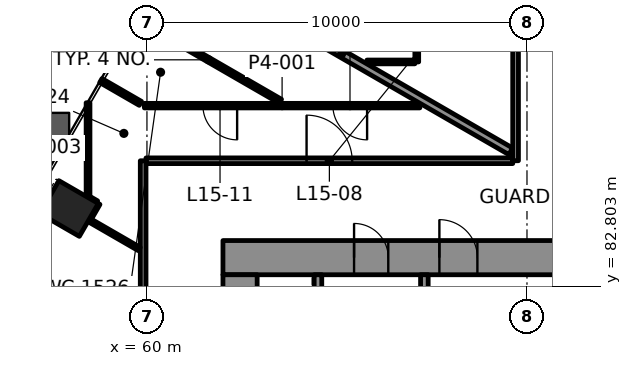
"""IFC4 building model, lengths in metres.
Left out: names, types, materials, properties, quantities, classifications, styles, units other than length and angle.
Written with IfcOpenShell. Run it as: python <this file> out.ifc"""

import sys

from ifc_helpers import new_model, si_unit, direction, frame, frame_2d, origin, origin_2d, place, context, subcontext, project, spatial, rectangle, extrude, element, fill, save


model = new_model("IFC4")
c1 = context("Model", 3, precision=1e-05, world=origin(), true_north=direction((0.0, 1.0)))
c2 = subcontext(c1, "Body", "Model", "MODEL_VIEW")
j1 = project(units=[si_unit("LENGTHUNIT", "METRE"), si_unit("PLANEANGLEUNIT", "RADIAN")], contexts=[c1])
p1 = place(None, origin())
s1 = spatial("IfcSite", under=j1, at=p1, CompositionType="ELEMENT")
p2 = place(p1, origin())
s2 = spatial("IfcBuilding", under=s1, at=p2, CompositionType="ELEMENT")
p3 = place(p2, frame((0.0, 0.0, 69.4)))
s3 = spatial("IfcBuildingStorey", under=s2, at=p3, CompositionType="ELEMENT", Elevation=69.4)
p4 = place(p3, frame((57.951, 84.843, -0.0), z_axis=(0.0, 0.0, 1.0), x_axis=(-0.5, -0.866025403784, 0.0)))
e1 = element("IfcColumn", 1, at=p4, inside=s3, PredefinedType="COLUMN", context=c2, shape_type="SweptSolid", body=[
    extrude(rectangle(XDim=1.0, YDim=1.2, at=origin_2d()), origin(), (0.0, 0.0, 1.0), 4.2),
])
p5 = place(p3, frame((62.0, 83.55, 0.0), z_axis=(0.0, 0.0, 1.0), x_axis=(1.0, 0.0, 0.0)))
e2 = element("IfcWall", 2, at=p5, inside=s3, PredefinedType="SHEAR", context=c2, shape_type="SweptSolid", body=[
    extrude(rectangle(XDim=26.0, YDim=0.9, at=frame_2d((13.0, 0.0))), origin(), (0.0, 0.0, 1.0), 4.0),
])
p6 = place(p5, frame((5.695, 0.0, 0.0)))
e3 = element("IfcOpeningElement", 3, at=p6, cuts=e2, PredefinedType="OPENING", context=c2, shape_type="SweptSolid", body=[
    extrude(rectangle(XDim=1.0, YDim=2.1, at=frame_2d((0.5, 1.05))), frame((0.0, 0.46, 0.0), z_axis=(0.0, -1.0, 0.0), x_axis=(1.0, 0.0, 0.0)), (0.0, 0.0, 1.0), 0.92),
])
p7 = place(p5, frame((19.505, 0.0, 0.0)))
e4 = element("IfcOpeningElement", 4, at=p7, cuts=e2, PredefinedType="OPENING", context=c2, shape_type="SweptSolid", body=[
    extrude(rectangle(XDim=1.0, YDim=2.1, at=frame_2d((0.5, 1.05))), frame((0.0, 0.46, 0.0), z_axis=(0.0, -1.0, 0.0), x_axis=(1.0, 0.0, 0.0)), (0.0, 0.0, 1.0), 0.92),
])
p8 = place(p5, frame((3.45, 0.0, 0.0)))
e5 = element("IfcOpeningElement", 5, at=p8, cuts=e2, PredefinedType="OPENING", context=c2, shape_type="SweptSolid", body=[
    extrude(rectangle(XDim=0.9, YDim=2.1, at=frame_2d((0.45, 1.05))), frame((0.0, 0.46, 0.0), z_axis=(0.0, -1.0, 0.0), x_axis=(1.0, 0.0, 0.0)), (0.0, 0.0, 1.0), 0.92),
])
p9 = place(p5, frame((12.65, 0.0, 0.0)))
e6 = element("IfcOpeningElement", 6, at=p9, cuts=e2, PredefinedType="OPENING", context=c2, shape_type="SweptSolid", body=[
    extrude(rectangle(XDim=0.9, YDim=2.1, at=frame_2d((0.45, 1.05))), frame((0.0, 0.46, 0.0), z_axis=(0.0, -1.0, 0.0), x_axis=(1.0, 0.0, 0.0)), (0.0, 0.0, 1.0), 0.92),
])
p10 = place(p5, frame((22.55, 0.0, 0.0)))
e7 = element("IfcOpeningElement", 7, at=p10, cuts=e2, PredefinedType="OPENING", context=c2, shape_type="SweptSolid", body=[
    extrude(rectangle(XDim=0.9, YDim=2.1, at=frame_2d((0.45, 1.05))), frame((0.0, 0.46, 0.0), z_axis=(0.0, -1.0, 0.0), x_axis=(1.0, 0.0, 0.0)), (0.0, 0.0, 1.0), 0.92),
])
p11 = place(p3, frame((62.45, 66.9, 0.0), z_axis=(0.0, 0.0, 1.0), x_axis=(0.0, 1.0, 0.0)))
e8 = element("IfcWall", 8, at=p11, inside=s3, PredefinedType="SHEAR", context=c2, shape_type="SweptSolid", body=[
    extrude(rectangle(XDim=16.2, YDim=0.9, at=frame_2d((8.1, 0.0))), origin(), (0.0, 0.0, 1.0), 4.0),
])
p12 = place(p11, frame((5.5, 0.0, 0.0)))
e9 = element("IfcOpeningElement", 9, at=p12, cuts=e8, PredefinedType="OPENING", context=c2, shape_type="SweptSolid", body=[
    extrude(rectangle(XDim=1.8, YDim=2.1, at=frame_2d((0.9, 1.05))), frame((0.0, 0.46, 0.0), z_axis=(0.0, -1.0, 0.0), x_axis=(1.0, 0.0, 0.0)), (0.0, 0.0, 1.0), 0.92),
])
p13 = place(p3, frame((59.976, 86.1, 0.0), z_axis=(0.0, 0.0, 1.0), x_axis=(1.0, 0.0, 0.0)))
e10 = element("IfcWall", 10, at=p13, inside=s3, PredefinedType="PARTITIONING", context=c2, shape_type="SweptSolid", body=[
    extrude(rectangle(XDim=9.649, YDim=0.15, at=frame_2d((4.825, 0.0))), origin(), (0.0, 0.0, 1.0), 3.4),
])
p14 = place(p13, frame((4.225, 0.0, 0.0)))
e11 = element("IfcOpeningElement", 11, at=p14, cuts=e10, PredefinedType="OPENING", context=c2, shape_type="SweptSolid", body=[
    extrude(rectangle(XDim=1.2, YDim=2.1, at=frame_2d((0.6, 1.05))), frame((0.0, 0.085, 0.0), z_axis=(0.0, -1.0, 0.0), x_axis=(1.0, 0.0, 0.0)), (0.0, 0.0, 1.0), 0.17),
])
p15 = place(p3, frame((67.181, 87.55, 0.0), z_axis=(0.0, 0.0, 1.0), x_axis=(-1.0, 0.0, 0.0)))
e12 = element("IfcWall", 12, at=p15, inside=s3, PredefinedType="PARTITIONING", context=c2, shape_type="SweptSolid", body=[
    extrude(rectangle(XDim=7.249, YDim=0.12, at=frame_2d((3.625, 0.0))), origin(), (0.0, 0.0, 1.0), 3.4),
])
p16 = place(p15, frame((1.388, 0.0, 0.0)))
e13 = element("IfcOpeningElement", 13, at=p16, cuts=e12, PredefinedType="OPENING", context=c2, shape_type="SweptSolid", body=[
    extrude(rectangle(XDim=0.9, YDim=2.1, at=frame_2d((0.45, 1.05))), frame((0.0, 0.07, 0.0), z_axis=(0.0, -1.0, 0.0), x_axis=(1.0, 0.0, 0.0)), (0.0, 0.0, 1.0), 0.14),
])
p17 = place(p15, frame((4.807, 0.0, 0.0)))
e14 = element("IfcOpeningElement", 14, at=p17, cuts=e12, PredefinedType="OPENING", context=c2, shape_type="SweptSolid", body=[
    extrude(rectangle(XDim=0.9, YDim=2.1, at=frame_2d((0.45, 1.05))), frame((0.0, 0.07, 0.0), z_axis=(0.0, -1.0, 0.0), x_axis=(1.0, 0.0, 0.0)), (0.0, 0.0, 1.0), 0.14),
])
p18 = place(p3, frame((65.789, 88.7, 0.0), z_axis=(0.0, 0.0, 1.0), x_axis=(1.0, 0.0, 0.0)))
e15 = element("IfcWall", 15, at=p18, inside=s3, PredefinedType="PARTITIONING", context=c2, shape_type="SweptSolid", body=[
    extrude(rectangle(XDim=1.261, YDim=0.1, at=frame_2d((0.631, 0.0))), origin(), (0.0, 0.0, 1.0), 3.4),
])
p19 = place(p3, frame((58.496, 84.587, 0.0), z_axis=(0.0, 0.0, 1.0), x_axis=(0.500114568548, 0.865959247497, 0.0)))
e16 = element("IfcWall", 16, at=p19, inside=s3, PredefinedType="PARTITIONING", context=c2, shape_type="SweptSolid", body=[
    extrude(rectangle(XDim=0.449, YDim=0.1, at=frame_2d((0.225, 0.0))), origin(), (0.0, 0.0, 1.0), 3.4),
])
p20 = place(p3, frame((69.7, 86.1, 0.0), z_axis=(0.0, 0.0, 1.0), x_axis=(0.0, 1.0, 0.0)))
e17 = element("IfcWall", 17, at=p20, inside=s3, PredefinedType="PARTITIONING", context=c2, shape_type="SweptSolid", body=[
    extrude(rectangle(XDim=10.6, YDim=0.15, at=frame_2d((5.3, 0.0))), origin(), (0.0, 0.0, 1.0), 3.4),
])
p21 = place(p3, frame((67.1, 99.3, 0.0), z_axis=(0.0, 0.0, 1.0), x_axis=(0.0, -1.0, 0.0)))
e18 = element("IfcWall", 18, at=p21, inside=s3, PredefinedType="PARTITIONING", context=c2, shape_type="SweptSolid", body=[
    extrude(rectangle(XDim=10.6, YDim=0.1, at=frame_2d((5.3, 0.0))), origin(), (0.0, 0.0, 1.0), 3.4),
])
p22 = place(p21, frame((7.088, 0.0, 0.0)))
e19 = element("IfcOpeningElement", 19, at=p22, cuts=e18, PredefinedType="OPENING", context=c2, shape_type="SweptSolid", body=[
    extrude(rectangle(XDim=0.9, YDim=2.1, at=frame_2d((0.45, 1.05))), frame((0.0, 0.06, 0.0), z_axis=(0.0, -1.0, 0.0), x_axis=(1.0, 0.0, 0.0)), (0.0, 0.0, 1.0), 0.12),
])
p23 = place(p3, frame((59.9, 67.321, 0.0), z_axis=(0.0, 0.0, 1.0), x_axis=(0.0, 1.0, 0.0)))
e20 = element("IfcWall", 20, at=p23, inside=s3, PredefinedType="PARTITIONING", context=c2, shape_type="SweptSolid", body=[
    extrude(rectangle(XDim=18.778, YDim=0.15, at=frame_2d((9.389, 0.0))), origin(), (0.0, 0.0, 1.0), 3.4),
])
p24 = place(p3, frame((58.45, 85.133, 0.0), z_axis=(0.0, 0.0, 1.0), x_axis=(0.0, 1.0, 0.0)))
e21 = element("IfcWall", 21, at=p24, inside=s3, PredefinedType="PARTITIONING", context=c2, shape_type="SweptSolid", body=[
    extrude(rectangle(XDim=2.494, YDim=0.1, at=frame_2d((1.247, 0.0))), origin(), (0.0, 0.0, 1.0), 3.165),
])
p25 = place(p3, frame((69.573, 86.348, 0.0), z_axis=(0.0, 0.0, 1.0), x_axis=(-0.866024495625, 0.500001572974, 0.0)))
e22 = element("IfcWall", 22, at=p25, inside=s3, PredefinedType="PARTITIONING", context=c2, shape_type="SweptSolid", body=[
    extrude(rectangle(XDim=10.272, YDim=0.2, at=frame_2d((5.136, 0.0))), origin(), (0.0, 0.0, 1.0), 3.165),
])
p26 = place(p3, frame((63.512, 87.665, 0.0), z_axis=(0.0, 0.0, 1.0), x_axis=(-0.866014185868, 0.500019429497, 0.0)))
e23 = element("IfcWall", 23, at=p26, inside=s3, PredefinedType="PARTITIONING", context=c2, shape_type="SweptSolid", body=[
    extrude(rectangle(XDim=4.365, YDim=0.12, at=frame_2d((2.182, 0.0))), origin(), (0.0, 0.0, 1.0), 3.165),
])
p27 = place(p3, frame((59.828, 87.61, 0.0), z_axis=(0.0, 0.0, 1.0), x_axis=(-0.865996090227, 0.500050769134, 0.0)))
e24 = element("IfcWall", 24, at=p27, inside=s3, PredefinedType="PARTITIONING", context=c2, shape_type="SweptSolid", body=[
    extrude(rectangle(XDim=1.202, YDim=0.12, at=frame_2d((0.601, 0.0))), origin(), (0.0, 0.0, 1.0), 3.165),
])
p28 = place(p3, frame((58.677, 85.001, 0.0), z_axis=(0.0, 0.0, 1.0), x_axis=(-0.86610613113, 0.49986015006, 0.0)))
e25 = element("IfcWall", 25, at=p28, inside=s3, PredefinedType="PARTITIONING", context=c2, shape_type="SweptSolid", body=[
    extrude(rectangle(XDim=0.205, YDim=0.1, at=frame_2d((0.102, 0.0))), origin(), (0.0, 0.0, 1.0), 3.4),
])
p29 = place(p3, frame((59.799, 83.776, 0.0), z_axis=(0.0, 0.0, 1.0), x_axis=(-0.866029087811, 0.499993619025, 0.0)))
e26 = element("IfcWall", 26, at=p29, inside=s3, PredefinedType="PARTITIONING", context=c2, shape_type="SweptSolid", body=[
    extrude(rectangle(XDim=1.533, YDim=0.1, at=frame_2d((0.766, 0.0))), origin(), (0.0, 0.0, 1.0), 3.4),
])
p30 = place(p3, frame((64.5, 77.9, 0.0), z_axis=(0.0, 0.0, 1.0), x_axis=(0.0, 1.0, 0.0)))
e27 = element("IfcWall", 27, at=p30, inside=s3, PredefinedType="PARTITIONING", context=c2, shape_type="SweptSolid", body=[
    extrude(rectangle(XDim=5.2, YDim=0.2, at=frame_2d((2.6, 0.0))), origin(), (0.0, 0.0, 1.0), 4.0),
])
p31 = place(p3, frame((67.3, 81.28, 0.0), z_axis=(0.0, 0.0, 1.0), x_axis=(0.0, 1.0, 0.0)))
e28 = element("IfcWall", 28, at=p31, inside=s3, PredefinedType="PARTITIONING", context=c2, shape_type="SweptSolid", body=[
    extrude(rectangle(XDim=1.82, YDim=0.2, at=frame_2d((0.91, 0.0))), origin(), (0.0, 0.0, 1.0), 4.0),
])
p32 = place(p14, origin())
e29 = element("IfcDoor", 29, at=p32, inside=s3, OperationType="DOUBLE_DOOR_SINGLE_SWING", PredefinedType="DOOR", context=c2, shape_type="SweptSolid", body=[
    extrude(rectangle(XDim=1.2, YDim=2.1, at=frame_2d((0.6, 1.05))), frame((0.0, 0.025, 0.0), z_axis=(0.0, -1.0, 0.0), x_axis=(1.0, 0.0, 0.0)), (0.0, 0.0, 1.0), 0.05),
])
fill(e11, e29)
p33 = place(p16, origin())
e30 = element("IfcDoor", 30, at=p33, inside=s3, OperationType="SINGLE_SWING_LEFT", PredefinedType="DOOR", context=c2, shape_type="SweptSolid", body=[
    extrude(rectangle(XDim=0.9, YDim=2.1, at=frame_2d((0.45, 1.05))), frame((0.0, 0.025, 0.0), z_axis=(0.0, -1.0, 0.0), x_axis=(1.0, 0.0, 0.0)), (0.0, 0.0, 1.0), 0.05),
])
fill(e13, e30)
p34 = place(p17, origin())
e31 = element("IfcDoor", 31, at=p34, inside=s3, OperationType="SINGLE_SWING_RIGHT", PredefinedType="DOOR", context=c2, shape_type="SweptSolid", body=[
    extrude(rectangle(XDim=0.9, YDim=2.1, at=frame_2d((0.45, 1.05))), frame((0.0, 0.025, 0.0), z_axis=(0.0, -1.0, 0.0), x_axis=(1.0, 0.0, 0.0)), (0.0, 0.0, 1.0), 0.05),
])
fill(e14, e31)
p35 = place(p6, origin())
e32 = element("IfcDoor", 32, at=p35, inside=s3, OperationType="SINGLE_SWING_LEFT", PredefinedType="DOOR", context=c2, shape_type="SweptSolid", body=[
    extrude(rectangle(XDim=1.0, YDim=2.1, at=frame_2d((0.5, 1.05))), frame((0.0, 0.17, 0.0), z_axis=(0.0, -1.0, 0.0), x_axis=(1.0, 0.0, 0.0)), (0.0, 0.0, 1.0), 0.34),
])
fill(e3, e32)
p36 = place(p8, origin())
e33 = element("IfcDoor", 33, at=p36, inside=s3, OperationType="SINGLE_SWING_RIGHT", PredefinedType="DOOR", context=c2, shape_type="SweptSolid", body=[
    extrude(rectangle(XDim=0.9, YDim=2.1, at=frame_2d((0.45, 1.05))), frame((0.0, 0.17, 0.0), z_axis=(0.0, -1.0, 0.0), x_axis=(1.0, 0.0, 0.0)), (0.0, 0.0, 1.0), 0.34),
])
fill(e5, e33)
save(model, sys.argv[1])
